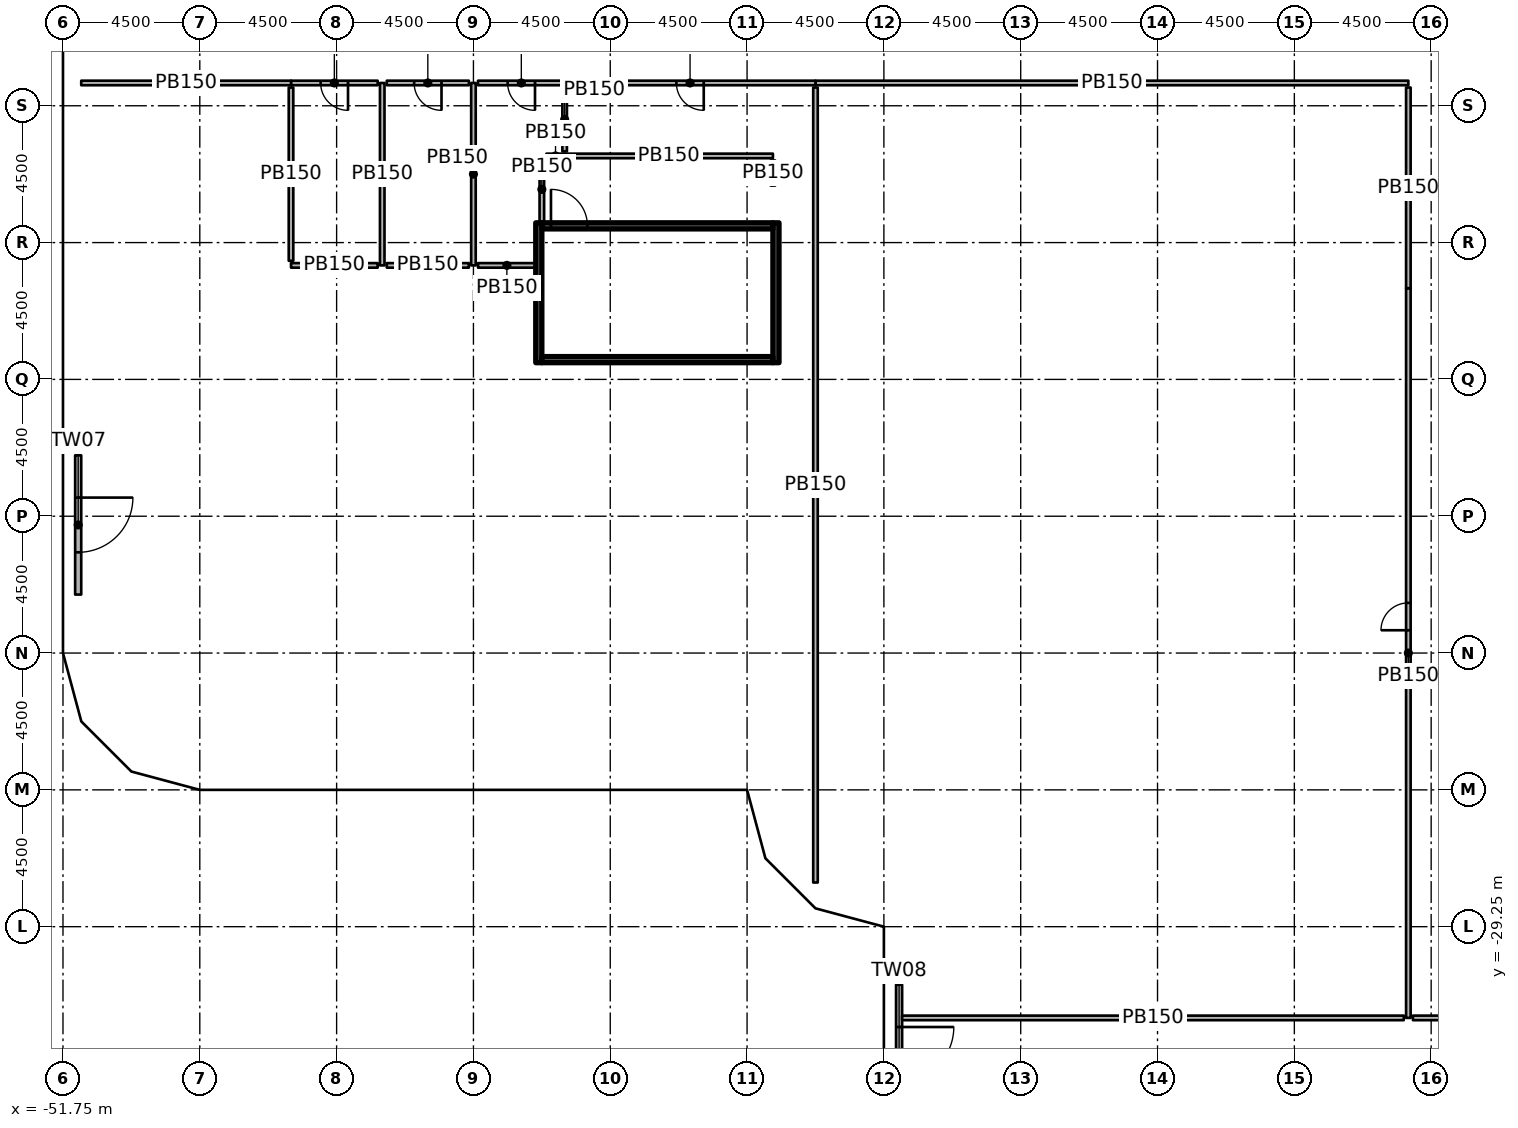
"""IFC4 building model, lengths in metres.
Left out: names, types, materials, properties, quantities, classifications, styles, units other than length and angle.
Written with IfcOpenShell. Run it as: python <this file> out.ifc"""

import sys

from ifc_helpers import new_model, si_unit, direction, frame, frame_2d, origin, origin_2d, place, context, subcontext, project, spatial, rectangle, extrude, element, fill, save


model = new_model("IFC4")
c1 = context("Model", 3, precision=1e-05, world=origin(), true_north=direction((0.0, 1.0)))
c2 = subcontext(c1, "Body", "Model", "MODEL_VIEW")
j1 = project(units=[si_unit("LENGTHUNIT", "METRE"), si_unit("PLANEANGLEUNIT", "RADIAN")], contexts=[c1])
p1 = place(None, origin())
s1 = spatial("IfcSite", under=j1, at=p1, CompositionType="ELEMENT")
p2 = place(p1, origin())
s2 = spatial("IfcBuilding", under=s1, at=p2, CompositionType="ELEMENT")
p3 = place(p2, frame((0.0, 0.0, 7.0)))
s3 = spatial("IfcBuildingStorey", under=s2, at=p3, CompositionType="ELEMENT", Elevation=7.0)
for number, where, z_axis, x_axis in (
    (1, (-51.15, -11.25, 0.0), (0.0, 0.0, 1.0), (1.0, 0.0, 0.0)),
    (2, (-46.47, -15.75, 0.0), (0.0, 0.0, 1.0), (1.0, 0.0, 0.0)),
    (3, (-46.65, -2.25, 0.0), (0.0, 0.0, 1.0), (1.0, 0.0, 0.0)),
    (4, (-42.75, -19.47, 0.0), (0.0, 0.0, 1.0), (1.0, 0.0, 0.0)),
    (5, (-38.25, -24.15, 0.0), (0.0, 0.0, 1.0), (1.0, 0.0, 0.0)),
    (6, (-33.75, -15.15, 0.0), (0.0, 0.0, 1.0), (1.0, 0.0, 0.0)),
    (7, (-33.11, -2.25, 0.0), (0.0, 0.0, 1.0), (1.0, 0.0, 0.0)),
    (8, (-28.65, -24.15, 0.0), (0.0, 0.0, 1.0), (1.0, 0.0, 0.0)),
    (9, (-29.25, -19.65, 0.0), (0.0, 0.0, 1.0), (1.0, 0.0, 0.0)),
    (10, (-28.908, -5.475, 0.0), (0.0, 0.0, 1.0), (1.0, 0.0, 0.0)),
    (11, (-24.15, -28.65, 0.0), (0.0, 0.0, 1.0), (1.0, 0.0, 0.0)),
    (12, (-24.15, -19.65, 0.0), (0.0, 0.0, 1.0), (1.0, 0.0, 0.0)),
    (13, (-24.75, -10.65, 0.0), (0.0, 0.0, 1.0), (1.0, 0.0, 0.0)),
    (14, (-24.75, -6.25, 0.0), (0.0, 0.0, 1.0), (1.0, 0.0, 0.0)),
    (15, (-19.65, -29.25, 0.0), (0.0, 0.0, 1.0), (1.0, 0.0, 0.0)),
    (16, (-19.65, -24.15, 0.0), (0.0, 0.0, 1.0), (1.0, 0.0, 0.0)),
    (17, (-19.65, -15.15, 0.0), (0.0, 0.0, 1.0), (1.0, 0.0, 0.0)),
    (18, (-20.25, -6.11, 0.0), (0.0, 0.0, 1.0), (1.0, 0.0, 0.0)),
    (19, (-15.15, -33.75, 0.0), (0.0, 0.0, 1.0), (1.0, 0.0, 0.0)),
    (20, (-15.15, -19.65, 0.0), (0.0, 0.0, 1.0), (1.0, 0.0, 0.0)),
    (21, (-15.15, -10.65, 0.0), (0.0, 0.0, 1.0), (1.0, 0.0, 0.0)),
    (22, (-15.75, -6.25, 0.0), (0.0, 0.0, 1.0), (1.0, 0.0, 0.0)),
    (23, (-10.65, -24.75, 0.0), (0.0, 0.0, 1.0), (1.0, 0.0, 0.0)),
    (24, (-10.65, -15.15, 0.0), (0.0, 0.0, 1.0), (1.0, 0.0, 0.0)),
    (25, (-10.75, -6.25, 0.0), (0.0, 0.0, 1.0), (1.0, 0.0, 0.0)),
    (26, (-6.25, -26.9, 0.0), (0.0, 0.0, 1.0), (1.0, 0.0, 0.0)),
    (27, (-6.25, -24.65, 0.0), (0.0, 0.0, 1.0), (1.0, 0.0, 0.0)),
    (28, (-6.25, -20.25, 0.0), (0.0, 0.0, 1.0), (1.0, 0.0, 0.0)),
    (29, (-6.25, -15.75, 0.0), (0.0, 0.0, 1.0), (1.0, 0.0, 0.0)),
    (30, (-6.25, -10.75, 0.0), (0.0, 0.0, 1.0), (1.0, 0.0, 0.0)),
    (31, (-6.25, -6.25, 0.0), (0.0, 0.0, 1.0), (1.0, 0.0, 0.0)),
):
    element("IfcColumn", number, at=place(p3, frame(where, z_axis=z_axis, x_axis=x_axis)), inside=s3, PredefinedType="COLUMN", context=c2, shape_type="SweptSolid", body=[
        extrude(rectangle(XDim=1.2, YDim=1.2, at=origin_2d()), origin(), (0.0, 0.0, 1.0), 4.55),
    ])
p4 = place(p3, frame((-51.25, -13.747, 0.0), z_axis=(0.0, 0.0, 1.0), x_axis=(0.0, -1.0, 0.0)))
e32 = element("IfcWall", 32, at=p4, inside=s3, PredefinedType="SOLIDWALL", context=c2, shape_type="SweptSolid", body=[
    extrude(rectangle(XDim=4.58, YDim=0.2, at=frame_2d((2.29, 0.0))), origin(), (0.0, 0.0, 1.0), 4.55),
])
p5 = place(p4, frame((1.39, 0.0, 0.0)))
e33 = element("IfcOpeningElement", 33, at=p5, cuts=e32, PredefinedType="OPENING", context=c2, shape_type="SweptSolid", body=[
    extrude(rectangle(XDim=1.8, YDim=2.4, at=frame_2d((0.9, 1.2))), frame((0.0, 0.11, 0.0), z_axis=(0.0, -1.0, 0.0), x_axis=(1.0, 0.0, 0.0)), (0.0, 0.0, 1.0), 0.22),
])
p6 = place(p3, frame((-24.25, -31.16, 0.0), z_axis=(0.0, 0.0, 1.0), x_axis=(0.0, -1.0, 0.0)))
e34 = element("IfcWall", 34, at=p6, inside=s3, PredefinedType="SOLIDWALL", context=c2, shape_type="SweptSolid", body=[
    extrude(rectangle(XDim=4.58, YDim=0.2, at=frame_2d((2.29, 0.0))), origin(), (0.0, 0.0, 1.0), 4.55),
])
p7 = place(p6, frame((1.39, 0.0, 0.0)))
e35 = element("IfcOpeningElement", 35, at=p7, cuts=e34, PredefinedType="OPENING", context=c2, shape_type="SweptSolid", body=[
    extrude(rectangle(XDim=1.8, YDim=2.4, at=frame_2d((0.9, 1.2))), frame((0.0, 0.11, 0.0), z_axis=(0.0, -1.0, 0.0), x_axis=(1.0, 0.0, 0.0)), (0.0, 0.0, 1.0), 0.22),
])
for number, where, z_axis, x_axis in (
    (36, (-36.1, -10.7, 0.0), (0.0, 0.0, 1.0), (0.0, 1.0, 0.0)),
    (37, (-28.3, -10.7, 0.0), (0.0, 0.0, 1.0), (0.0, 1.0, 0.0)),
):
    element("IfcWall", number, at=place(p3, frame(where, z_axis=z_axis, x_axis=x_axis)), inside=s3, PredefinedType="SHEAR", context=c2, shape_type="SweptSolid", body=[
        extrude(rectangle(XDim=4.6, YDim=0.2, at=frame_2d((2.3, 0.0))), origin(), (0.0, 0.0, 1.0), 4.55),
    ])
p8 = place(p3, frame((-36.0, -10.6, 0.0), z_axis=(0.0, 0.0, 1.0), x_axis=(1.0, 0.0, 0.0)))
e38 = element("IfcWall", 38, at=p8, inside=s3, PredefinedType="SHEAR", context=c2, shape_type="SweptSolid", body=[
    extrude(rectangle(XDim=7.6, YDim=0.2, at=frame_2d((3.8, 0.0))), origin(), (0.0, 0.0, 1.0), 4.55),
])
p9 = place(p3, frame((-36.0, -6.2, 0.0), z_axis=(0.0, 0.0, 1.0), x_axis=(1.0, 0.0, 0.0)))
e39 = element("IfcWall", 39, at=p9, inside=s3, PredefinedType="SHEAR", context=c2, shape_type="SweptSolid", body=[
    extrude(rectangle(XDim=7.6, YDim=0.2, at=frame_2d((3.8, 0.0))), origin(), (0.0, 0.0, 1.0), 4.55),
])
p10 = place(p9, frame((0.3, 0.0, 0.0)))
e40 = element("IfcOpeningElement", 40, at=p10, cuts=e39, PredefinedType="OPENING", context=c2, shape_type="SweptSolid", body=[
    extrude(rectangle(XDim=1.2, YDim=2.1, at=frame_2d((0.6, 1.05))), frame((0.0, 0.11, 0.0), z_axis=(0.0, -1.0, 0.0), x_axis=(1.0, 0.0, 0.0)), (0.0, 0.0, 1.0), 0.22),
])
p11 = place(p3, frame((-36.0, -6.1, 0.0), z_axis=(0.0, 0.0, 1.0), x_axis=(0.0, 1.0, 0.0)))
e41 = element("IfcWall", 41, at=p11, inside=s3, PredefinedType="PARTITIONING", context=c2, shape_type="SweptSolid", body=[
    extrude(rectangle(XDim=2.2, YDim=0.15, at=frame_2d((1.1, 0.0))), origin(), (0.0, 0.0, 1.0), 4.55),
])
p12 = place(p3, frame((-35.85, -3.9, 0.0), z_axis=(0.0, 0.0, 1.0), x_axis=(1.0, 0.0, 0.0)))
e42 = element("IfcWall", 42, at=p12, inside=s3, PredefinedType="PARTITIONING", context=c2, shape_type="SweptSolid", body=[
    extrude(rectangle(XDim=0.6, YDim=0.15, at=frame_2d((0.3, 0.0))), origin(), (0.0, 0.0, 1.0), 4.55),
])
p13 = place(p3, frame((-35.25, -3.9, 0.0), z_axis=(0.0, 0.0, 1.0), x_axis=(1.0, 0.0, 0.0)))
e43 = element("IfcWall", 43, at=p13, inside=s3, PredefinedType="PARTITIONING", context=c2, shape_type="SweptSolid", body=[
    extrude(rectangle(XDim=6.85, YDim=0.15, at=frame_2d((3.425, 0.0))), origin(), (0.0, 0.0, 1.0), 4.55),
])
p14 = place(p3, frame((-28.4, -4.05, 0.0), z_axis=(0.0, 0.0, 1.0), x_axis=(0.0, -1.0, 0.0)))
e44 = element("IfcWall", 44, at=p14, inside=s3, PredefinedType="PARTITIONING", context=c2, shape_type="SweptSolid", body=[
    extrude(rectangle(XDim=0.825, YDim=0.15, at=frame_2d((0.413, 0.0))), origin(), (0.0, 0.0, 1.0), 4.55),
])
p15 = place(p3, frame((-41.25, -1.5, 0.0), z_axis=(0.0, 0.0, 1.0), x_axis=(0.0, -1.0, 0.0)))
e45 = element("IfcWall", 45, at=p15, inside=s3, PredefinedType="PARTITIONING", context=c2, shape_type="SweptSolid", body=[
    extrude(rectangle(XDim=6.0, YDim=0.15, at=frame_2d((3.0, 0.0))), origin(), (0.0, 0.0, 1.0), 4.55),
])
p16 = place(p3, frame((-41.4, -1.5, 0.0), z_axis=(0.0, 0.0, 1.0), x_axis=(-1.0, 0.0, 0.0)))
e46 = element("IfcWall", 46, at=p16, inside=s3, PredefinedType="PARTITIONING", context=c2, shape_type="SweptSolid", body=[
    extrude(rectangle(XDim=2.85, YDim=0.15, at=frame_2d((1.425, 0.0))), origin(), (0.0, 0.0, 1.0), 4.55),
])
p17 = place(p16, frame((0.975, 0.0, 0.0)))
e47 = element("IfcOpeningElement", 47, at=p17, cuts=e46, PredefinedType="OPENING", context=c2, shape_type="SweptSolid", body=[
    extrude(rectangle(XDim=0.9, YDim=2.1, at=frame_2d((0.45, 1.05))), frame((0.0, 0.085, 0.0), z_axis=(0.0, -1.0, 0.0), x_axis=(1.0, 0.0, 0.0)), (0.0, 0.0, 1.0), 0.17),
])
p18 = place(p3, frame((-41.4, -7.5, 0.0), z_axis=(0.0, 0.0, 1.0), x_axis=(-1.0, 0.0, 0.0)))
e48 = element("IfcWall", 48, at=p18, inside=s3, PredefinedType="PARTITIONING", context=c2, shape_type="SweptSolid", body=[
    extrude(rectangle(XDim=2.85, YDim=0.15, at=frame_2d((1.425, 0.0))), origin(), (0.0, 0.0, 1.0), 4.55),
])
p19 = place(p3, frame((-44.25, -7.35, 0.0), z_axis=(0.0, 0.0, 1.0), x_axis=(0.0, 1.0, 0.0)))
e49 = element("IfcWall", 49, at=p19, inside=s3, PredefinedType="PARTITIONING", context=c2, shape_type="SweptSolid", body=[
    extrude(rectangle(XDim=5.7, YDim=0.15, at=frame_2d((2.85, 0.0))), origin(), (0.0, 0.0, 1.0), 4.55),
])
p20 = place(p3, frame((-38.25, -1.5, 0.0), z_axis=(0.0, 0.0, 1.0), x_axis=(0.0, -1.0, 0.0)))
e50 = element("IfcWall", 50, at=p20, inside=s3, PredefinedType="PARTITIONING", context=c2, shape_type="SweptSolid", body=[
    extrude(rectangle(XDim=6.0, YDim=0.15, at=frame_2d((3.0, 0.0))), origin(), (0.0, 0.0, 1.0), 4.55),
])
p21 = place(p3, frame((-38.4, -1.5, 0.0), z_axis=(0.0, 0.0, 1.0), x_axis=(-1.0, 0.0, 0.0)))
e51 = element("IfcWall", 51, at=p21, inside=s3, PredefinedType="PARTITIONING", context=c2, shape_type="SweptSolid", body=[
    extrude(rectangle(XDim=2.7, YDim=0.15, at=frame_2d((1.35, 0.0))), origin(), (0.0, 0.0, 1.0), 4.55),
])
p22 = place(p21, frame((0.9, 0.0, 0.0)))
e52 = element("IfcOpeningElement", 52, at=p22, cuts=e51, PredefinedType="OPENING", context=c2, shape_type="SweptSolid", body=[
    extrude(rectangle(XDim=0.9, YDim=2.1, at=frame_2d((0.45, 1.05))), frame((0.0, 0.085, 0.0), z_axis=(0.0, -1.0, 0.0), x_axis=(1.0, 0.0, 0.0)), (0.0, 0.0, 1.0), 0.17),
])
p23 = place(p3, frame((-38.4, -7.5, 0.0), z_axis=(0.0, 0.0, 1.0), x_axis=(-1.0, 0.0, 0.0)))
e53 = element("IfcWall", 53, at=p23, inside=s3, PredefinedType="PARTITIONING", context=c2, shape_type="SweptSolid", body=[
    extrude(rectangle(XDim=2.7, YDim=0.15, at=frame_2d((1.35, 0.0))), origin(), (0.0, 0.0, 1.0), 4.55),
])
p24 = place(p3, frame((-35.25, -1.5, 0.0), z_axis=(0.0, 0.0, 1.0), x_axis=(-1.0, 0.0, 0.0)))
e54 = element("IfcWall", 54, at=p24, inside=s3, PredefinedType="PARTITIONING", context=c2, shape_type="SweptSolid", body=[
    extrude(rectangle(XDim=2.85, YDim=0.15, at=frame_2d((1.425, 0.0))), origin(), (0.0, 0.0, 1.0), 4.55),
])
p25 = place(p24, frame((0.975, 0.0, 0.0)))
e55 = element("IfcOpeningElement", 55, at=p25, cuts=e54, PredefinedType="OPENING", context=c2, shape_type="SweptSolid", body=[
    extrude(rectangle(XDim=0.9, YDim=2.1, at=frame_2d((0.45, 1.05))), frame((0.0, 0.085, 0.0), z_axis=(0.0, -1.0, 0.0), x_axis=(1.0, 0.0, 0.0)), (0.0, 0.0, 1.0), 0.17),
])
p26 = place(p3, frame((-36.2, -7.5, 0.0), z_axis=(0.0, 0.0, 1.0), x_axis=(-1.0, 0.0, 0.0)))
e56 = element("IfcWall", 56, at=p26, inside=s3, PredefinedType="PARTITIONING", context=c2, shape_type="SweptSolid", body=[
    extrude(rectangle(XDim=1.9, YDim=0.15, at=frame_2d((0.95, 0.0))), origin(), (0.0, 0.0, 1.0), 4.55),
])
p27 = place(p3, frame((-35.25, -1.65, 0.0), z_axis=(0.0, 0.0, 1.0), x_axis=(0.0, -1.0, 0.0)))
e57 = element("IfcWall", 57, at=p27, inside=s3, PredefinedType="PARTITIONING", context=c2, shape_type="SweptSolid", body=[
    extrude(rectangle(XDim=2.1, YDim=0.15, at=frame_2d((1.05, 0.0))), origin(), (0.0, 0.0, 1.0), 4.55),
])
p28 = place(p3, frame((-7.5, -32.25, 0.0), z_axis=(0.0, 0.0, 1.0), x_axis=(0.0, 1.0, 0.0)))
e58 = element("IfcWall", 58, at=p28, inside=s3, PredefinedType="PARTITIONING", context=c2, shape_type="SweptSolid", body=[
    extrude(rectangle(XDim=24.0, YDim=0.15, at=frame_2d((12.0, 0.0))), origin(), (0.0, 0.0, 1.0), 4.55),
])
p29 = place(p28, frame((12.75, 0.0, 0.0)))
e59 = element("IfcOpeningElement", 59, at=p29, cuts=e58, PredefinedType="OPENING", context=c2, shape_type="SweptSolid", body=[
    extrude(rectangle(XDim=0.9, YDim=2.1, at=frame_2d((0.45, 1.05))), frame((0.0, 0.085, 0.0), z_axis=(0.0, -1.0, 0.0), x_axis=(1.0, 0.0, 0.0)), (0.0, 0.0, 1.0), 0.17),
])
p30 = place(p3, frame((-1.5, -32.25, 0.0), z_axis=(0.0, 0.0, 1.0), x_axis=(-1.0, 0.0, 0.0)))
e60 = element("IfcWall", 60, at=p30, inside=s3, PredefinedType="PARTITIONING", context=c2, shape_type="SweptSolid", body=[
    extrude(rectangle(XDim=5.85, YDim=0.15, at=frame_2d((2.925, 0.0))), origin(), (0.0, 0.0, 1.0), 4.55),
])
p31 = place(p3, frame((-7.5, -1.5, 0.0), z_axis=(0.0, 0.0, 1.0), x_axis=(-1.0, 0.0, 0.0)))
e61 = element("IfcWall", 61, at=p31, inside=s3, PredefinedType="PARTITIONING", context=c2, shape_type="SweptSolid", body=[
    extrude(rectangle(XDim=19.5, YDim=0.15, at=frame_2d((9.75, 0.0))), origin(), (0.0, 0.0, 1.0), 4.55),
])
p32 = place(p3, frame((-44.25, -1.5, 0.0), z_axis=(0.0, 0.0, 1.0), x_axis=(-1.0, 0.0, 0.0)))
e62 = element("IfcWall", 62, at=p32, inside=s3, PredefinedType="PARTITIONING", context=c2, shape_type="SweptSolid", body=[
    extrude(rectangle(XDim=6.9, YDim=0.15, at=frame_2d((3.45, 0.0))), origin(), (0.0, 0.0, 1.0), 4.55),
])
p33 = place(p3, frame((-27.0, -1.5, 0.0), z_axis=(0.0, 0.0, 1.0), x_axis=(-1.0, 0.0, 0.0)))
e63 = element("IfcWall", 63, at=p33, inside=s3, PredefinedType="PARTITIONING", context=c2, shape_type="SweptSolid", body=[
    extrude(rectangle(XDim=8.25, YDim=0.15, at=frame_2d((4.125, 0.0))), origin(), (0.0, 0.0, 1.0), 4.55),
])
p34 = place(p33, frame((3.675, 0.0, 0.0)))
e64 = element("IfcOpeningElement", 64, at=p34, cuts=e63, PredefinedType="OPENING", context=c2, shape_type="SweptSolid", body=[
    extrude(rectangle(XDim=0.9, YDim=2.1, at=frame_2d((0.45, 1.05))), frame((0.0, 0.085, 0.0), z_axis=(0.0, -1.0, 0.0), x_axis=(1.0, 0.0, 0.0)), (0.0, 0.0, 1.0), 0.17),
])
p35 = place(p3, frame((-27.0, -27.797, 0.0), z_axis=(0.0, 0.0, 1.0), x_axis=(0.0, 1.0, 0.0)))
e65 = element("IfcWall", 65, at=p35, inside=s3, PredefinedType="PARTITIONING", context=c2, shape_type="SweptSolid", body=[
    extrude(rectangle(XDim=26.147, YDim=0.15, at=frame_2d((13.074, 0.0))), origin(), (0.0, 0.0, 1.0), 4.55),
])
p36 = place(p3, frame((-7.65, -32.25, 0.0), z_axis=(0.0, 0.0, 1.0), x_axis=(-1.0, 0.0, 0.0)))
e66 = element("IfcWall", 66, at=p36, inside=s3, PredefinedType="PARTITIONING", context=c2, shape_type="SweptSolid", body=[
    extrude(rectangle(XDim=16.5, YDim=0.15, at=frame_2d((8.25, 0.0))), origin(), (0.0, 0.0, 1.0), 4.55),
])
p37 = place(p3, frame((-7.5, -1.65, 0.0), z_axis=(0.0, 0.0, 1.0), x_axis=(0.0, -1.0, 0.0)))
e67 = element("IfcWall", 67, at=p37, inside=s3, PredefinedType="PARTITIONING", context=c2, shape_type="SweptSolid", body=[
    extrude(rectangle(XDim=6.6, YDim=0.15, at=frame_2d((3.3, 0.0))), origin(), (0.0, 0.0, 1.0), 4.55),
])
p38 = place(p5, origin())
e68 = element("IfcDoor", 68, at=p38, inside=s3, OperationType="SINGLE_SWING_LEFT", PredefinedType="DOOR", context=c2, shape_type="SweptSolid", body=[
    extrude(rectangle(XDim=1.8, YDim=2.4, at=frame_2d((0.9, 1.2))), frame((0.0, 0.025, 0.0), z_axis=(0.0, -1.0, 0.0), x_axis=(1.0, 0.0, 0.0)), (0.0, 0.0, 1.0), 0.05),
])
fill(e33, e68)
p39 = place(p7, origin())
e69 = element("IfcDoor", 69, at=p39, inside=s3, OperationType="SINGLE_SWING_LEFT", PredefinedType="DOOR", context=c2, shape_type="SweptSolid", body=[
    extrude(rectangle(XDim=1.8, YDim=2.4, at=frame_2d((0.9, 1.2))), frame((0.0, 0.025, 0.0), z_axis=(0.0, -1.0, 0.0), x_axis=(1.0, 0.0, 0.0)), (0.0, 0.0, 1.0), 0.05),
])
fill(e35, e69)
p40 = place(p10, origin())
e70 = element("IfcDoor", 70, at=p40, inside=s3, OperationType="SINGLE_SWING_RIGHT", PredefinedType="DOOR", context=c2, shape_type="SweptSolid", body=[
    extrude(rectangle(XDim=1.2, YDim=2.1, at=frame_2d((0.6, 1.05))), frame((0.0, 0.025, 0.0), z_axis=(0.0, -1.0, 0.0), x_axis=(1.0, 0.0, 0.0)), (0.0, 0.0, 1.0), 0.05),
])
fill(e40, e70)
p41 = place(p17, origin())
e71 = element("IfcDoor", 71, at=p41, inside=s3, OperationType="SINGLE_SWING_LEFT", PredefinedType="DOOR", context=c2, shape_type="SweptSolid", body=[
    extrude(rectangle(XDim=0.9, YDim=2.1, at=frame_2d((0.45, 1.05))), frame((0.0, 0.025, 0.0), z_axis=(0.0, -1.0, 0.0), x_axis=(1.0, 0.0, 0.0)), (0.0, 0.0, 1.0), 0.05),
])
fill(e47, e71)
p42 = place(p22, origin())
e72 = element("IfcDoor", 72, at=p42, inside=s3, OperationType="SINGLE_SWING_LEFT", PredefinedType="DOOR", context=c2, shape_type="SweptSolid", body=[
    extrude(rectangle(XDim=0.9, YDim=2.1, at=frame_2d((0.45, 1.05))), frame((0.0, 0.025, 0.0), z_axis=(0.0, -1.0, 0.0), x_axis=(1.0, 0.0, 0.0)), (0.0, 0.0, 1.0), 0.05),
])
fill(e52, e72)
p43 = place(p25, origin())
e73 = element("IfcDoor", 73, at=p43, inside=s3, OperationType="SINGLE_SWING_LEFT", PredefinedType="DOOR", context=c2, shape_type="SweptSolid", body=[
    extrude(rectangle(XDim=0.9, YDim=2.1, at=frame_2d((0.45, 1.05))), frame((0.0, 0.025, 0.0), z_axis=(0.0, -1.0, 0.0), x_axis=(1.0, 0.0, 0.0)), (0.0, 0.0, 1.0), 0.05),
])
fill(e55, e73)
p44 = place(p29, origin())
e74 = element("IfcDoor", 74, at=p44, inside=s3, OperationType="SINGLE_SWING_LEFT", PredefinedType="DOOR", context=c2, shape_type="SweptSolid", body=[
    extrude(rectangle(XDim=0.9, YDim=2.1, at=frame_2d((0.45, 1.05))), frame((0.0, 0.025, 0.0), z_axis=(0.0, -1.0, 0.0), x_axis=(1.0, 0.0, 0.0)), (0.0, 0.0, 1.0), 0.05),
])
fill(e59, e74)
p45 = place(p34, origin())
e75 = element("IfcDoor", 75, at=p45, inside=s3, OperationType="SINGLE_SWING_LEFT", PredefinedType="DOOR", context=c2, shape_type="SweptSolid", body=[
    extrude(rectangle(XDim=0.9, YDim=2.1, at=frame_2d((0.45, 1.05))), frame((0.0, 0.025, 0.0), z_axis=(0.0, -1.0, 0.0), x_axis=(1.0, 0.0, 0.0)), (0.0, 0.0, 1.0), 0.05),
])
fill(e64, e75)
save(model, sys.argv[1])
